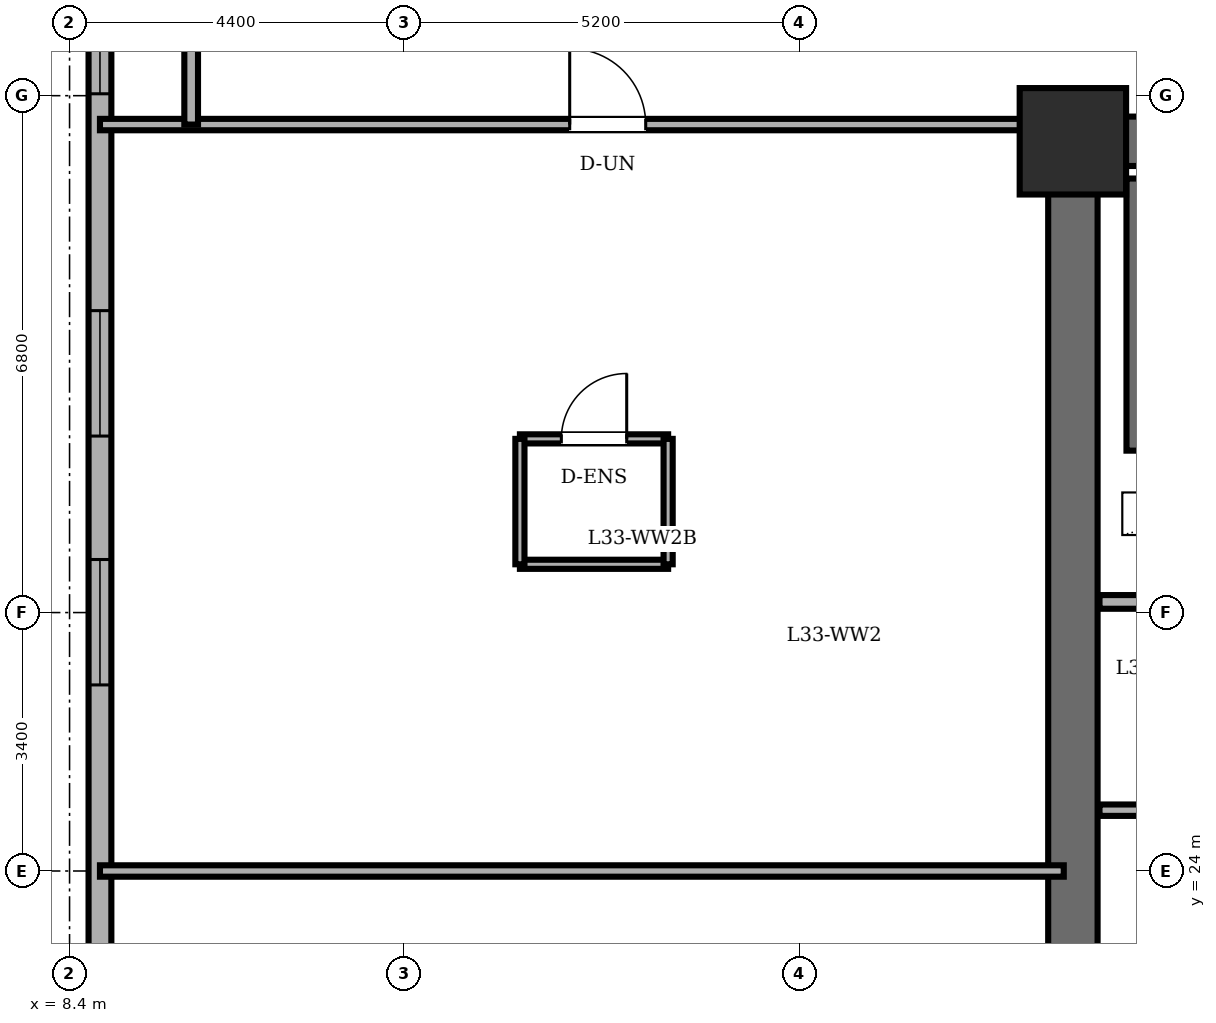
"""IFC4 building model, lengths in metres.
Left out: names, types, materials, properties, quantities, classifications, styles, units other than length and angle.
Written with IfcOpenShell. Run it as: python <this file> out.ifc"""

import sys

from ifc_helpers import new_model, si_unit, direction, frame, frame_2d, origin, origin_2d, place, context, subcontext, project, spatial, rectangle, extrude, element, fill, save


model = new_model("IFC4")
c1 = context("Model", 3, precision=1e-05, world=origin(), true_north=direction((0.0, 1.0)))
c2 = subcontext(c1, "Body", "Model", "MODEL_VIEW")
j1 = project(units=[si_unit("LENGTHUNIT", "METRE"), si_unit("PLANEANGLEUNIT", "RADIAN")], contexts=[c1])
p1 = place(None, origin())
s1 = spatial("IfcSite", under=j1, at=p1, CompositionType="ELEMENT")
p2 = place(p1, origin())
s2 = spatial("IfcBuilding", under=s1, at=p2, CompositionType="ELEMENT")
p3 = place(p2, frame((0.0, 0.0, 125.9)))
s3 = spatial("IfcBuildingStorey", under=s2, at=p3, CompositionType="ELEMENT", Elevation=125.9)
p4 = place(p3, frame((21.6, 33.6, 0.0), z_axis=(0.0, 0.0, 1.0), x_axis=(1.0, 0.0, 0.0)))
e1 = element("IfcColumn", 1, at=p4, inside=s3, PredefinedType="COLUMN", context=c2, shape_type="SweptSolid", body=[
    extrude(rectangle(XDim=1.4, YDim=1.4, at=origin_2d()), origin(), (0.0, 0.0, 1.0), 3.6),
])
p5 = place(p3, frame((8.8, 38.2, 0.0), z_axis=(0.0, 0.0, 1.0), x_axis=(0.0, -1.0, 0.0)))
e2 = element("IfcWall", 2, at=p5, inside=s3, PredefinedType="SOLIDWALL", context=c2, shape_type="SweptSolid", body=[
    extrude(rectangle(XDim=28.4, YDim=0.3, at=frame_2d((14.2, 0.0))), origin(), (0.0, 0.0, 1.0), 3.4),
])
p6 = place(p5, frame((2.325, 0.0, 0.85)))
e3 = element("IfcOpeningElement", 3, at=p6, cuts=e2, PredefinedType="OPENING", context=c2, shape_type="SweptSolid", body=[
    extrude(rectangle(XDim=1.65, YDim=1.55, at=frame_2d((0.825, 0.775))), frame((0.0, 0.16, 0.0), z_axis=(0.0, -1.0, 0.0), x_axis=(1.0, 0.0, 0.0)), (0.0, 0.0, 1.0), 0.32),
])
p7 = place(p5, frame((6.828, 0.0, 0.85)))
e4 = element("IfcOpeningElement", 4, at=p7, cuts=e2, PredefinedType="OPENING", context=c2, shape_type="SweptSolid", body=[
    extrude(rectangle(XDim=1.65, YDim=1.55, at=frame_2d((0.825, 0.775))), frame((0.0, 0.16, 0.0), z_axis=(0.0, -1.0, 0.0), x_axis=(1.0, 0.0, 0.0)), (0.0, 0.0, 1.0), 0.32),
])
p8 = place(p5, frame((10.102, 0.0, 0.85)))
e5 = element("IfcOpeningElement", 5, at=p8, cuts=e2, PredefinedType="OPENING", context=c2, shape_type="SweptSolid", body=[
    extrude(rectangle(XDim=1.65, YDim=1.55, at=frame_2d((0.825, 0.775))), frame((0.0, 0.16, 0.0), z_axis=(0.0, -1.0, 0.0), x_axis=(1.0, 0.0, 0.0)), (0.0, 0.0, 1.0), 0.32),
])
p9 = place(p5, frame((16.648, 0.0, 0.85)))
e6 = element("IfcOpeningElement", 6, at=p9, cuts=e2, PredefinedType="OPENING", context=c2, shape_type="SweptSolid", body=[
    extrude(rectangle(XDim=1.65, YDim=1.55, at=frame_2d((0.825, 0.775))), frame((0.0, 0.16, 0.0), z_axis=(0.0, -1.0, 0.0), x_axis=(1.0, 0.0, 0.0)), (0.0, 0.0, 1.0), 0.32),
])
p10 = place(p5, frame((19.922, 0.0, 0.85)))
e7 = element("IfcOpeningElement", 7, at=p10, cuts=e2, PredefinedType="OPENING", context=c2, shape_type="SweptSolid", body=[
    extrude(rectangle(XDim=1.65, YDim=1.55, at=frame_2d((0.825, 0.775))), frame((0.0, 0.16, 0.0), z_axis=(0.0, -1.0, 0.0), x_axis=(1.0, 0.0, 0.0)), (0.0, 0.0, 1.0), 0.32),
])
p11 = place(p5, frame((24.425, 0.0, 0.85)))
e8 = element("IfcOpeningElement", 8, at=p11, cuts=e2, PredefinedType="OPENING", context=c2, shape_type="SweptSolid", body=[
    extrude(rectangle(XDim=1.65, YDim=1.55, at=frame_2d((0.825, 0.775))), frame((0.0, 0.16, 0.0), z_axis=(0.0, -1.0, 0.0), x_axis=(1.0, 0.0, 0.0)), (0.0, 0.0, 1.0), 0.32),
])
p12 = place(p3, frame((21.6, 14.4, 0.0), z_axis=(0.0, 0.0, 1.0), x_axis=(0.0, 1.0, 0.0)))
e9 = element("IfcWall", 9, at=p12, inside=s3, PredefinedType="SHEAR", context=c2, shape_type="SweptSolid", body=[
    extrude(rectangle(XDim=19.2, YDim=0.65, at=frame_2d((9.6, 0.0))), origin(), (0.0, 0.0, 1.0), 3.4),
])
p13 = place(p3, frame((21.6, 33.6, 0.0), z_axis=(0.0, 0.0, 1.0), x_axis=(1.0, 0.0, 0.0)))
e10 = element("IfcWall", 10, at=p13, inside=s3, PredefinedType="SHEAR", context=c2, shape_type="SweptSolid", body=[
    extrude(rectangle(XDim=15.6, YDim=0.65, at=frame_2d((7.8, 0.0))), origin(), (0.0, 0.0, 1.0), 3.4),
])
p14 = place(p3, frame((22.48, 29.53, 0.0), z_axis=(0.0, 0.0, 1.0), x_axis=(0.0, 1.0, 0.0)))
e11 = element("IfcWall", 11, at=p14, inside=s3, PredefinedType="SOLIDWALL", context=c2, shape_type="SweptSolid", body=[
    extrude(rectangle(XDim=3.58, YDim=0.35, at=frame_2d((1.79, 0.0))), origin(), (0.0, 0.0, 1.0), 3.4),
])
p15 = place(p3, frame((21.95, 27.54, 0.0), z_axis=(0.0, 0.0, 1.0), x_axis=(1.0, 0.0, 0.0)))
e12 = element("IfcWall", 12, at=p15, inside=s3, PredefinedType="PARTITIONING", context=c2, shape_type="SweptSolid", body=[
    extrude(rectangle(XDim=10.56, YDim=0.18, at=frame_2d((5.28, 0.0))), origin(), (0.0, 0.0, 1.0), 3.4),
])
p16 = place(p3, frame((21.95, 24.8, 0.0), z_axis=(0.0, 0.0, 1.0), x_axis=(1.0, 0.0, 0.0)))
e13 = element("IfcWall", 13, at=p16, inside=s3, PredefinedType="PARTITIONING", context=c2, shape_type="SweptSolid", body=[
    extrude(rectangle(XDim=2.51, YDim=0.15, at=frame_2d((1.255, 0.0))), origin(), (0.0, 0.0, 1.0), 3.4),
])
p17 = place(p3, frame((14.325, 29.685, 0.0), z_axis=(0.0, 0.0, 1.0), x_axis=(1.0, 0.0, 0.0)))
e14 = element("IfcWall", 14, at=p17, inside=s3, PredefinedType="PARTITIONING", context=c2, shape_type="SweptSolid", body=[
    extrude(rectangle(XDim=1.95, YDim=0.12, at=frame_2d((0.975, 0.0))), origin(), (0.0, 0.0, 1.0), 3.4),
])
p18 = place(p17, frame((0.545, 0.0, 0.0)))
e15 = element("IfcOpeningElement", 15, at=p18, cuts=e14, PredefinedType="OPENING", context=c2, shape_type="SweptSolid", body=[
    extrude(rectangle(XDim=0.86, YDim=2.1, at=frame_2d((0.43, 1.05))), frame((0.0, 0.07, 0.0), z_axis=(0.0, -1.0, 0.0), x_axis=(1.0, 0.0, 0.0)), (0.0, 0.0, 1.0), 0.14),
])
p19 = place(p3, frame((16.275, 28.035, 0.0), z_axis=(0.0, 0.0, 1.0), x_axis=(-1.0, 0.0, 0.0)))
e16 = element("IfcWall", 16, at=p19, inside=s3, PredefinedType="PARTITIONING", context=c2, shape_type="SweptSolid", body=[
    extrude(rectangle(XDim=1.95, YDim=0.12, at=frame_2d((0.975, 0.0))), origin(), (0.0, 0.0, 1.0), 3.4),
])
for number, where, z_axis, x_axis in (
    (17, (14.325, 29.685, 0.0), (0.0, 0.0, 1.0), (0.0, -1.0, 0.0)),
    (18, (16.275, 28.035, 0.0), (0.0, 0.0, 1.0), (0.0, 1.0, 0.0)),
):
    element("IfcWall", number, at=place(p3, frame(where, z_axis=z_axis, x_axis=x_axis)), inside=s3, PredefinedType="PARTITIONING", context=c2, shape_type="SweptSolid", body=[
        extrude(rectangle(XDim=1.65, YDim=0.12, at=frame_2d((0.825, 0.0))), origin(), (0.0, 0.0, 1.0), 3.4),
    ])
p20 = place(p3, frame((8.8, 24.0, 0.0), z_axis=(0.0, 0.0, 1.0), x_axis=(1.0, 0.0, 0.0)))
e19 = element("IfcWall", 19, at=p20, inside=s3, PredefinedType="PARTITIONING", context=c2, shape_type="SweptSolid", body=[
    extrude(rectangle(XDim=12.68, YDim=0.15, at=frame_2d((6.34, 0.0))), origin(), (0.0, 0.0, 1.0), 3.4),
])
p21 = place(p3, frame((8.8, 33.82, 0.0), z_axis=(0.0, 0.0, 1.0), x_axis=(1.0, 0.0, 0.0)))
e20 = element("IfcWall", 20, at=p21, inside=s3, PredefinedType="PARTITIONING", context=c2, shape_type="SweptSolid", body=[
    extrude(rectangle(XDim=12.68, YDim=0.15, at=frame_2d((6.34, 0.0))), origin(), (0.0, 0.0, 1.0), 3.4),
])
p22 = place(p21, frame((6.18, 0.0, 0.0)))
e21 = element("IfcOpeningElement", 21, at=p22, cuts=e20, PredefinedType="OPENING", context=c2, shape_type="SweptSolid", body=[
    extrude(rectangle(XDim=1.0, YDim=2.15, at=frame_2d((0.5, 1.075))), frame((0.0, 0.085, 0.0), z_axis=(0.0, -1.0, 0.0), x_axis=(1.0, 0.0, 0.0)), (0.0, 0.0, 1.0), 0.17),
])
p23 = place(p3, frame((10.0, 33.82, 0.0), z_axis=(0.0, 0.0, 1.0), x_axis=(0.0, 1.0, 0.0)))
e22 = element("IfcWall", 22, at=p23, inside=s3, PredefinedType="PARTITIONING", context=c2, shape_type="SweptSolid", body=[
    extrude(rectangle(XDim=2.46, YDim=0.18, at=frame_2d((1.23, 0.0))), origin(), (0.0, 0.0, 1.0), 3.4),
])
p24 = place(p6, origin())
e23 = element("IfcWindow", 23, at=p24, inside=s3, PartitioningType="DOUBLE_PANEL_VERTICAL", PredefinedType="WINDOW", context=c2, shape_type="SweptSolid", body=[
    extrude(rectangle(XDim=1.65, YDim=1.55, at=frame_2d((0.825, 0.775))), frame((0.0, 0.03, 0.0), z_axis=(0.0, -1.0, 0.0), x_axis=(1.0, 0.0, 0.0)), (0.0, 0.0, 1.0), 0.06),
])
fill(e3, e23)
p25 = place(p7, origin())
e24 = element("IfcWindow", 24, at=p25, inside=s3, PartitioningType="DOUBLE_PANEL_VERTICAL", PredefinedType="WINDOW", context=c2, shape_type="SweptSolid", body=[
    extrude(rectangle(XDim=1.65, YDim=1.55, at=frame_2d((0.825, 0.775))), frame((0.0, 0.03, 0.0), z_axis=(0.0, -1.0, 0.0), x_axis=(1.0, 0.0, 0.0)), (0.0, 0.0, 1.0), 0.06),
])
fill(e4, e24)
p26 = place(p8, origin())
e25 = element("IfcWindow", 25, at=p26, inside=s3, PartitioningType="DOUBLE_PANEL_VERTICAL", PredefinedType="WINDOW", context=c2, shape_type="SweptSolid", body=[
    extrude(rectangle(XDim=1.65, YDim=1.55, at=frame_2d((0.825, 0.775))), frame((0.0, 0.03, 0.0), z_axis=(0.0, -1.0, 0.0), x_axis=(1.0, 0.0, 0.0)), (0.0, 0.0, 1.0), 0.06),
])
fill(e5, e25)
p27 = place(p18, origin())
e26 = element("IfcDoor", 26, at=p27, inside=s3, OperationType="SINGLE_SWING_RIGHT", PredefinedType="DOOR", context=c2, shape_type="SweptSolid", body=[
    extrude(rectangle(XDim=0.86, YDim=2.1, at=frame_2d((0.43, 1.05))), frame((0.0, 0.025, 0.0), z_axis=(0.0, -1.0, 0.0), x_axis=(1.0, 0.0, 0.0)), (0.0, 0.0, 1.0), 0.05),
])
fill(e15, e26)
p28 = place(p22, origin())
e27 = element("IfcDoor", 27, at=p28, inside=s3, OperationType="SINGLE_SWING_LEFT", PredefinedType="DOOR", context=c2, shape_type="SweptSolid", body=[
    extrude(rectangle(XDim=1.0, YDim=2.15, at=frame_2d((0.5, 1.075))), frame((0.0, 0.025, 0.0), z_axis=(0.0, -1.0, 0.0), x_axis=(1.0, 0.0, 0.0)), (0.0, 0.0, 1.0), 0.05),
])
fill(e21, e27)
save(model, sys.argv[1])
